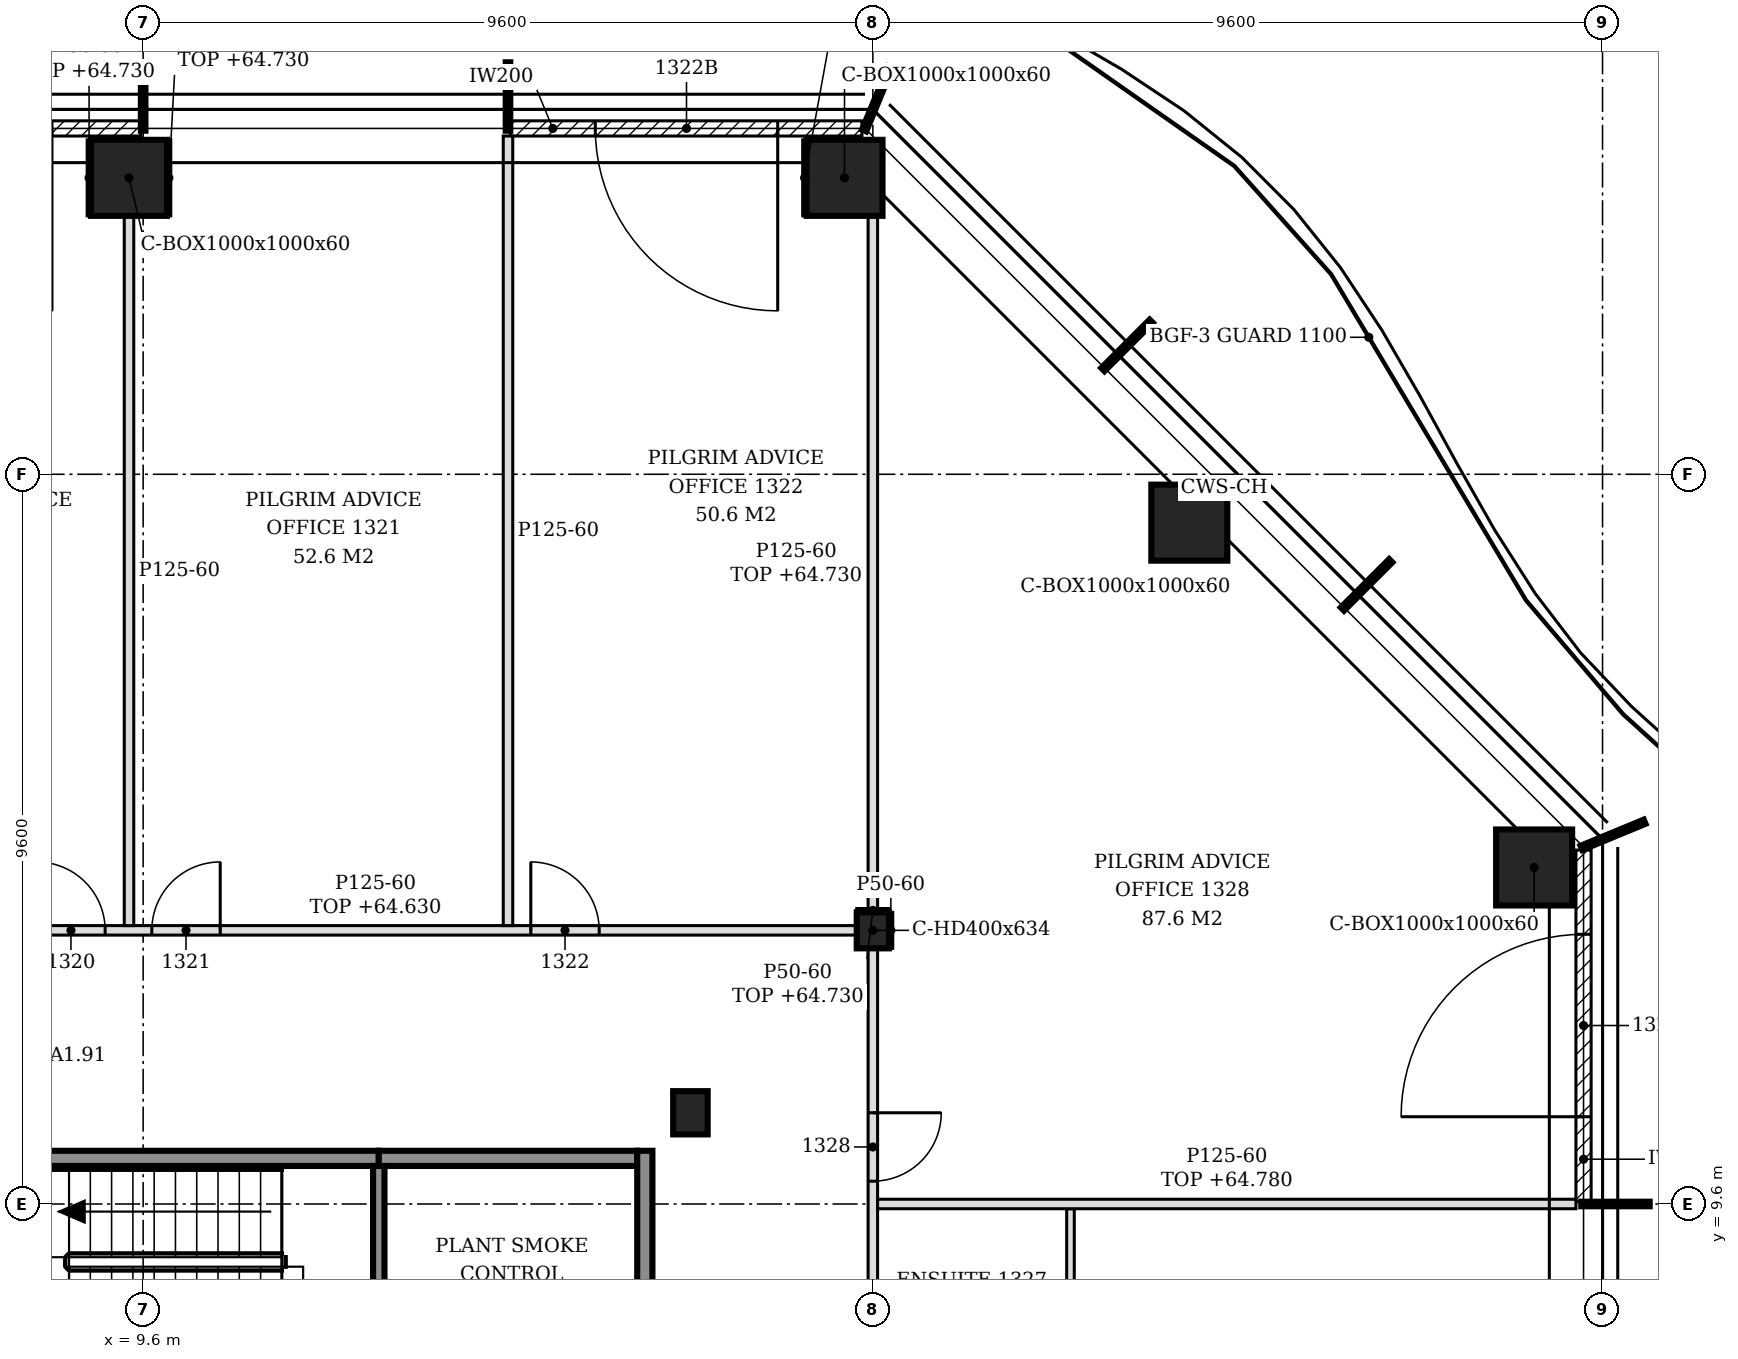
"""IFC4 building model, lengths in metres.
Left out: names, types, materials, properties, quantities, classifications, styles, units other than length and angle.
Written with IfcOpenShell. Run it as: python <this file> out.ifc"""

import sys

from ifc_helpers import new_model, si_unit, direction, frame, frame_2d, origin, origin_2d, place, context, subcontext, project, spatial, polyline, rectangle, hollow_rectangle, i_section, outline, extrude, element, fill, save


model = new_model("IFC4")
c1 = context("Model", 3, precision=1e-05, world=origin(), true_north=direction((0.0, 1.0)))
c2 = subcontext(c1, "Body", "Model", "MODEL_VIEW")
j1 = project(units=[si_unit("LENGTHUNIT", "METRE"), si_unit("PLANEANGLEUNIT", "RADIAN")], contexts=[c1])
p1 = place(None, origin())
s1 = spatial("IfcSite", under=j1, at=p1, CompositionType="ELEMENT")
p2 = place(p1, origin())
s2 = spatial("IfcBuilding", under=s1, at=p2, CompositionType="ELEMENT")
p3 = place(p2, frame((0.0, 0.0, 61.8)))
s3 = spatial("IfcBuildingStorey", under=s2, at=p3, CompositionType="ELEMENT", Elevation=61.8)
for number, where, z_axis, x_axis in (
    (1, (27.9, 14.027, -0.15), (0.0, 0.0, 1.0), (1.0, 0.0, 0.0)),
    (2, (23.364, 18.564, -0.15), (0.0, 0.0, 1.0), (1.0, 0.0, 0.0)),
    (3, (18.827, 23.1, -0.15), (0.0, 0.0, 1.0), (1.0, 0.0, 0.0)),
    (4, (9.414, 23.1, -0.15), (0.0, 0.0, 1.0), (1.0, 0.0, 0.0)),
):
    element("IfcColumn", number, at=place(p3, frame(where, z_axis=z_axis, x_axis=x_axis)), inside=s3, PredefinedType="COLUMN", context=c2, shape_type="SweptSolid", body=[
        extrude(hollow_rectangle(XDim=1.0, YDim=1.0, WallThickness=0.06, at=origin_2d()), origin(), (0.0, 0.0, 1.0), 3.6),
    ])
p4 = place(p3, frame((19.2, 13.2, -0.15), z_axis=(0.0, 0.0, 1.0), x_axis=(1.0, 0.0, 0.0)))
e5 = element("IfcColumn", 5, at=p4, inside=s3, PredefinedType="COLUMN", context=c2, shape_type="SweptSolid", body=[
    extrude(i_section(OverallWidth=0.424, OverallDepth=0.474, WebThickness=0.048, FlangeThickness=0.077, FilletRadius=0.015, at=origin_2d()), origin(), (0.0, 0.0, 1.0), 3.6),
])
p5 = place(p3, frame((16.8, 10.8, -0.15), z_axis=(0.0, 0.0, 1.0), x_axis=(1.0, 0.0, 0.0)))
e6 = element("IfcColumn", 6, at=p5, inside=s3, PredefinedType="COLUMN", context=c2, shape_type="SweptSolid", body=[
    extrude(i_section(OverallWidth=0.454, OverallDepth=0.569, WebThickness=0.078, FlangeThickness=0.125, FilletRadius=0.015, at=origin_2d()), origin(), (0.0, 0.0, 1.0), 3.6),
])
p6 = place(p3, frame((28.55, 9.63, 0.0), z_axis=(0.0, 0.0, 1.0), x_axis=(0.0, 1.0, 0.0)))
e7 = element("IfcWall", 7, at=p6, inside=s3, PredefinedType="NOTDEFINED", context=c2, shape_type="SweptSolid", body=[
    extrude(rectangle(XDim=4.626, YDim=0.2, at=frame_2d((2.313, 0.0))), origin(), (0.0, 0.0, 1.0), 3.45),
])
p7 = place(p6, frame((1.118, 0.0, 0.0)))
e8 = element("IfcOpeningElement", 8, at=p7, cuts=e7, PredefinedType="OPENING", context=c2, shape_type="SweptSolid", body=[
    extrude(rectangle(XDim=2.4, YDim=2.4, at=frame_2d((1.2, 1.2))), frame((0.0, 0.11, 0.0), z_axis=(0.0, -1.0, 0.0), x_axis=(1.0, 0.0, 0.0)), (0.0, 0.0, 1.0), 0.22),
])
p8 = place(p3, frame((19.056, 23.75, 0.0), z_axis=(0.0, 0.0, 1.0), x_axis=(-1.0, 0.0, 0.0)))
e9 = element("IfcWall", 9, at=p8, inside=s3, PredefinedType="NOTDEFINED", context=c2, shape_type="SweptSolid", body=[
    extrude(rectangle(XDim=4.626, YDim=0.2, at=frame_2d((2.313, 0.0))), origin(), (0.0, 0.0, 1.0), 3.45),
])
p9 = place(p8, frame((1.108, 0.0, 0.0)))
e10 = element("IfcOpeningElement", 10, at=p9, cuts=e9, PredefinedType="OPENING", context=c2, shape_type="SweptSolid", body=[
    extrude(rectangle(XDim=2.4, YDim=2.4, at=frame_2d((1.2, 1.2))), frame((0.0, 0.11, 0.0), z_axis=(0.0, -1.0, 0.0), x_axis=(1.0, 0.0, 0.0)), (0.0, 0.0, 1.0), 0.22),
])
p10 = place(p3, frame((9.57, 23.75, 0.0), z_axis=(0.0, 0.0, 1.0), x_axis=(-1.0, 0.0, 0.0)))
e11 = element("IfcWall", 11, at=p10, inside=s3, PredefinedType="NOTDEFINED", context=c2, shape_type="SweptSolid", body=[
    extrude(rectangle(XDim=4.74, YDim=0.2, at=frame_2d((2.37, 0.0))), origin(), (0.0, 0.0, 1.0), 3.45),
])
p11 = place(p10, frame((1.17, 0.0, 0.0)))
e12 = element("IfcOpeningElement", 12, at=p11, cuts=e11, PredefinedType="OPENING", context=c2, shape_type="SweptSolid", body=[
    extrude(rectangle(XDim=2.4, YDim=2.4, at=frame_2d((1.2, 1.2))), frame((0.0, 0.11, 0.0), z_axis=(0.0, -1.0, 0.0), x_axis=(1.0, 0.0, 0.0)), (0.0, 0.0, 1.0), 0.22),
])
p12 = place(p3, frame((6.2, 10.2, 0.0), z_axis=(0.0, 0.0, 1.0), x_axis=(1.0, 0.0, 0.0)))
e13 = element("IfcWall", 13, at=p12, inside=s3, PredefinedType="SOLIDWALL", context=c2, shape_type="SweptSolid", body=[
    extrude(rectangle(XDim=6.5, YDim=0.2, at=frame_2d((3.25, 0.0))), origin(), (0.0, 0.0, 1.0), 3.45),
])
p13 = place(p3, frame((12.7, 10.2, 0.0), z_axis=(0.0, 0.0, 1.0), x_axis=(1.0, 0.0, 0.0)))
e14 = element("IfcWall", 14, at=p13, inside=s3, PredefinedType="SOLIDWALL", context=c2, shape_type="SweptSolid", body=[
    extrude(rectangle(XDim=3.4, YDim=0.2, at=frame_2d((1.7, 0.0))), origin(), (0.0, 0.0, 1.0), 3.45),
])
p14 = place(p3, frame((12.7, 7.575, 0.0), z_axis=(0.0, 0.0, 1.0), x_axis=(0.0, 1.0, 0.0)))
e15 = element("IfcWall", 15, at=p14, inside=s3, PredefinedType="SOLIDWALL", context=c2, shape_type="SweptSolid", body=[
    extrude(rectangle(XDim=2.525, YDim=0.15, at=frame_2d((1.263, 0.0))), origin(), (0.0, 0.0, 1.0), 3.45),
])
p15 = place(p3, frame((16.2, -5.5, 0.0), z_axis=(0.0, 0.0, 1.0), x_axis=(0.0, 1.0, 0.0)))
e16 = element("IfcWall", 16, at=p15, inside=s3, PredefinedType="SOLIDWALL", context=c2, shape_type="SweptSolid", body=[
    extrude(rectangle(XDim=15.8, YDim=0.2, at=frame_2d((7.9, 0.0))), origin(), (0.0, 0.0, 1.0), 3.45),
])
p16 = place(p15, frame((3.05, 0.0, 0.0)))
e17 = element("IfcOpeningElement", 17, at=p16, cuts=e16, PredefinedType="OPENING", context=c2, shape_type="SweptSolid", body=[
    extrude(rectangle(XDim=1.3, YDim=2.1, at=frame_2d((0.65, 1.05))), frame((0.0, 0.11, 0.0), z_axis=(0.0, -1.0, 0.0), x_axis=(1.0, 0.0, 0.0)), (0.0, 0.0, 1.0), 0.22),
])
p17 = place(p15, frame((11.45, 0.0, 0.0)))
e18 = element("IfcOpeningElement", 18, at=p17, cuts=e16, PredefinedType="OPENING", context=c2, shape_type="SweptSolid", body=[
    extrude(rectangle(XDim=1.3, YDim=2.1, at=frame_2d((0.65, 1.05))), frame((0.0, 0.11, 0.0), z_axis=(0.0, -1.0, 0.0), x_axis=(1.0, 0.0, 0.0)), (0.0, 0.0, 1.0), 0.22),
])
p18 = place(p3, frame((19.2, 2.637, 0.0), z_axis=(0.0, 0.0, 1.0), x_axis=(0.0, 1.0, 0.0)))
e19 = element("IfcWall", 19, at=p18, inside=s3, PredefinedType="PARTITIONING", context=c2, shape_type="SweptSolid", body=[
    extrude(rectangle(XDim=10.326, YDim=0.125, at=frame_2d((5.163, 0.0))), origin(), (0.0, 0.0, 1.0), 2.83),
])
p19 = place(p18, frame((3.363, 0.0, 0.0)))
e20 = element("IfcOpeningElement", 20, at=p19, cuts=e19, PredefinedType="OPENING", context=c2, shape_type="SweptSolid", body=[
    extrude(rectangle(XDim=0.9, YDim=2.1, at=frame_2d((0.45, 1.05))), frame((0.0, 0.073, 0.0), z_axis=(0.0, -1.0, 0.0), x_axis=(1.0, 0.0, 0.0)), (0.0, 0.0, 1.0), 0.145),
])
p20 = place(p18, frame((7.263, 0.0, 0.0)))
e21 = element("IfcOpeningElement", 21, at=p20, cuts=e19, PredefinedType="OPENING", context=c2, shape_type="SweptSolid", body=[
    extrude(rectangle(XDim=0.9, YDim=2.1, at=frame_2d((0.45, 1.05))), frame((0.0, 0.073, 0.0), z_axis=(0.0, -1.0, 0.0), x_axis=(1.0, 0.0, 0.0)), (0.0, 0.0, 1.0), 0.145),
])
p21 = place(p3, frame((21.8, 7.25, 0.0), z_axis=(0.0, 0.0, 1.0), x_axis=(0.0, 1.0, 0.0)))
e22 = element("IfcWall", 22, at=p21, inside=s3, PredefinedType="PARTITIONING", context=c2, shape_type="SweptSolid", body=[
    extrude(outline(polyline([(0.0, 0.0), (2.288, 0.0), (2.288, 2.98), (2.255, 2.98), (2.253, 3.45), (0.0, 3.45), (0.0, 0.0)])), frame((0.0, 0.05, 0.0), z_axis=(0.0, -1.0, 0.0), x_axis=(1.0, 0.0, 0.0)), (0.0, 0.0, 1.0), 0.1),
])
p22 = place(p3, frame((19.262, 9.6, 0.0), z_axis=(0.0, 0.0, 1.0), x_axis=(1.0, 0.0, 0.0)))
e23 = element("IfcWall", 23, at=p22, inside=s3, PredefinedType="PARTITIONING", context=c2, shape_type="SweptSolid", body=[
    extrude(outline(polyline([(0.0, 0.0), (9.188, 0.0), (9.188, 2.98), (8.788, 2.98), (8.785, 2.93), (8.488, 2.93), (8.486, 2.98), (0.087, 2.98), (0.085, 2.83), (0.0, 2.83), (0.0, 0.0)])), frame((0.0, 0.062, 0.0), z_axis=(0.0, -1.0, 0.0), x_axis=(1.0, 0.0, 0.0)), (0.0, 0.0, 1.0), 0.125),
])
p23 = place(p3, frame((7.412, 13.2, 0.0), z_axis=(0.0, 0.0, 1.0), x_axis=(1.0, 0.0, 0.0)))
e24 = element("IfcWall", 24, at=p23, inside=s3, PredefinedType="PARTITIONING", context=c2, shape_type="SweptSolid", body=[
    extrude(rectangle(XDim=11.576, YDim=0.125, at=frame_2d((5.788, 0.0))), origin(), (0.0, 0.0, 1.0), 2.83),
])
p24 = place(p23, frame((0.788, 0.0, 0.0)))
e25 = element("IfcOpeningElement", 25, at=p24, cuts=e24, PredefinedType="OPENING", context=c2, shape_type="SweptSolid", body=[
    extrude(rectangle(XDim=0.9, YDim=2.1, at=frame_2d((0.45, 1.05))), frame((0.0, 0.073, 0.0), z_axis=(0.0, -1.0, 0.0), x_axis=(1.0, 0.0, 0.0)), (0.0, 0.0, 1.0), 0.145),
])
p25 = place(p23, frame((2.302, 0.0, 0.0)))
e26 = element("IfcOpeningElement", 26, at=p25, cuts=e24, PredefinedType="OPENING", context=c2, shape_type="SweptSolid", body=[
    extrude(rectangle(XDim=0.9, YDim=2.1, at=frame_2d((0.45, 1.05))), frame((0.0, 0.073, 0.0), z_axis=(0.0, -1.0, 0.0), x_axis=(1.0, 0.0, 0.0)), (0.0, 0.0, 1.0), 0.145),
])
p26 = place(p23, frame((7.288, 0.0, 0.0)))
e27 = element("IfcOpeningElement", 27, at=p26, cuts=e24, PredefinedType="OPENING", context=c2, shape_type="SweptSolid", body=[
    extrude(rectangle(XDim=0.9, YDim=2.1, at=frame_2d((0.45, 1.05))), frame((0.0, 0.073, 0.0), z_axis=(0.0, -1.0, 0.0), x_axis=(1.0, 0.0, 0.0)), (0.0, 0.0, 1.0), 0.145),
])
p27 = place(p3, frame((9.414, 13.262, 0.0), z_axis=(0.0, 0.0, 1.0), x_axis=(0.0, 1.0, 0.0)))
e28 = element("IfcWall", 28, at=p27, inside=s3, PredefinedType="PARTITIONING", context=c2, shape_type="SweptSolid", body=[
    extrude(outline(polyline([(0.0, 0.0), (9.338, 0.0), (9.337, 3.45), (6.042, 3.45), (6.041, 2.88), (5.833, 2.88), (5.831, 3.45), (0.087, 3.45), (0.085, 2.83), (0.0, 2.83), (0.0, 0.0)])), frame((0.0, 0.062, 0.0), z_axis=(0.0, -1.0, 0.0), x_axis=(1.0, 0.0, 0.0)), (0.0, 0.0, 1.0), 0.125),
])
p28 = place(p3, frame((14.4, 13.262, 0.0), z_axis=(0.0, 0.0, 1.0), x_axis=(0.0, 1.0, 0.0)))
e29 = element("IfcWall", 29, at=p28, inside=s3, PredefinedType="PARTITIONING", context=c2, shape_type="SweptSolid", body=[
    extrude(outline(polyline([(0.0, 0.0), (10.387, 0.0), (10.387, 3.45), (9.988, 3.45), (9.986, 2.93), (9.688, 2.93), (9.686, 3.45), (6.042, 3.45), (6.041, 2.88), (5.833, 2.88), (5.831, 3.45), (0.087, 3.45), (0.085, 2.83), (0.0, 2.83), (0.0, 0.0)])), frame((0.0, 0.062, 0.0), z_axis=(0.0, -1.0, 0.0), x_axis=(1.0, 0.0, 0.0)), (0.0, 0.0, 1.0), 0.125),
])
p29 = place(p3, frame((19.2, 13.437, 0.0), z_axis=(0.0, 0.0, 1.0), x_axis=(0.0, 1.0, 0.0)))
e30 = element("IfcWall", 30, at=p29, inside=s3, PredefinedType="PARTITIONING", context=c2, shape_type="SweptSolid", body=[
    extrude(outline(polyline([(0.0, 0.0), (9.163, 0.0), (9.163, 2.63), (8.733, 2.63), (8.731, 2.93), (0.0, 2.93), (0.0, 0.0)])), frame((0.0, 0.062, 0.0), z_axis=(0.0, -1.0, 0.0), x_axis=(1.0, 0.0, 0.0)), (0.0, 0.0, 1.0), 0.125),
])
p30 = place(p3, frame((19.437, 12.963, 0.0), z_axis=(0.0, 0.0, 1.0), x_axis=(0.0, 1.0, 0.0)))
e31 = element("IfcWall", 31, at=p30, inside=s3, PredefinedType="PARTITIONING", context=c2, shape_type="SweptSolid", body=[
    extrude(rectangle(XDim=0.474, YDim=0.05, at=frame_2d((0.237, 0.0))), origin(), (0.0, 0.0, 1.0), 3.45),
])
p31 = place(p3, frame((18.988, 13.462, 0.0), z_axis=(0.0, 0.0, 1.0), x_axis=(1.0, 0.0, 0.0)))
e32 = element("IfcWall", 32, at=p31, inside=s3, PredefinedType="PARTITIONING", context=c2, shape_type="SweptSolid", body=[
    extrude(rectangle(XDim=0.424, YDim=0.05, at=frame_2d((0.212, 0.0))), origin(), (0.0, 0.0, 1.0), 2.93),
])
for number, where, z_axis, x_axis in (
    (33, (18.302, 22.6, 0.0), (0.0, 0.0, 1.0), (0.0, 1.0, 0.0)),
    (34, (8.889, 22.6, 0.0), (0.0, 0.0, 1.0), (0.0, 1.0, 0.0)),
    (35, (9.939, 22.6, 0.0), (0.0, 0.0, 1.0), (0.0, 1.0, 0.0)),
):
    element("IfcWall", number, at=place(p3, frame(where, z_axis=z_axis, x_axis=x_axis)), inside=s3, PredefinedType="PARTITIONING", context=c2, shape_type="SweptSolid", body=[
        extrude(rectangle(XDim=1.0, YDim=0.05, at=frame_2d((0.5, 0.0))), origin(), (0.0, 0.0, 1.0), 2.93),
    ])
p32 = place(p7, origin())
e36 = element("IfcDoor", 36, at=p32, inside=s3, OperationType="SINGLE_SWING_LEFT", PredefinedType="DOOR", context=c2, shape_type="SweptSolid", body=[
    extrude(rectangle(XDim=2.4, YDim=2.4, at=frame_2d((1.2, 1.2))), frame((0.0, 0.025, 0.0), z_axis=(0.0, -1.0, 0.0), x_axis=(1.0, 0.0, 0.0)), (0.0, 0.0, 1.0), 0.05),
])
fill(e8, e36)
p33 = place(p9, origin())
e37 = element("IfcDoor", 37, at=p33, inside=s3, OperationType="SINGLE_SWING_LEFT", PredefinedType="DOOR", context=c2, shape_type="SweptSolid", body=[
    extrude(rectangle(XDim=2.4, YDim=2.4, at=frame_2d((1.2, 1.2))), frame((0.0, 0.025, 0.0), z_axis=(0.0, -1.0, 0.0), x_axis=(1.0, 0.0, 0.0)), (0.0, 0.0, 1.0), 0.05),
])
fill(e10, e37)
p34 = place(p24, origin())
e38 = element("IfcDoor", 38, at=p34, inside=s3, OperationType="SINGLE_SWING_LEFT", PredefinedType="DOOR", context=c2, shape_type="SweptSolid", body=[
    extrude(rectangle(XDim=0.9, YDim=2.1, at=frame_2d((0.45, 1.05))), frame((0.0, 0.025, 0.0), z_axis=(0.0, -1.0, 0.0), x_axis=(1.0, 0.0, 0.0)), (0.0, 0.0, 1.0), 0.05),
])
fill(e25, e38)
p35 = place(p25, origin())
e39 = element("IfcDoor", 39, at=p35, inside=s3, OperationType="SINGLE_SWING_RIGHT", PredefinedType="DOOR", context=c2, shape_type="SweptSolid", body=[
    extrude(rectangle(XDim=0.9, YDim=2.1, at=frame_2d((0.45, 1.05))), frame((0.0, 0.025, 0.0), z_axis=(0.0, -1.0, 0.0), x_axis=(1.0, 0.0, 0.0)), (0.0, 0.0, 1.0), 0.05),
])
fill(e26, e39)
p36 = place(p26, origin())
e40 = element("IfcDoor", 40, at=p36, inside=s3, OperationType="SINGLE_SWING_LEFT", PredefinedType="DOOR", context=c2, shape_type="SweptSolid", body=[
    extrude(rectangle(XDim=0.9, YDim=2.1, at=frame_2d((0.45, 1.05))), frame((0.0, 0.025, 0.0), z_axis=(0.0, -1.0, 0.0), x_axis=(1.0, 0.0, 0.0)), (0.0, 0.0, 1.0), 0.05),
])
fill(e27, e40)
p37 = place(p20, frame((0.9, 0.0, 0.0), z_axis=(0.0, 0.0, 1.0), x_axis=(-1.0, 0.0, 0.0)))
e41 = element("IfcDoor", 41, at=p37, inside=s3, OperationType="SINGLE_SWING_LEFT", PredefinedType="DOOR", context=c2, shape_type="SweptSolid", body=[
    extrude(rectangle(XDim=0.9, YDim=2.1, at=frame_2d((0.45, 1.05))), frame((0.0, 0.025, 0.0), z_axis=(0.0, -1.0, 0.0), x_axis=(1.0, 0.0, 0.0)), (0.0, 0.0, 1.0), 0.05),
])
fill(e21, e41)
save(model, sys.argv[1])
